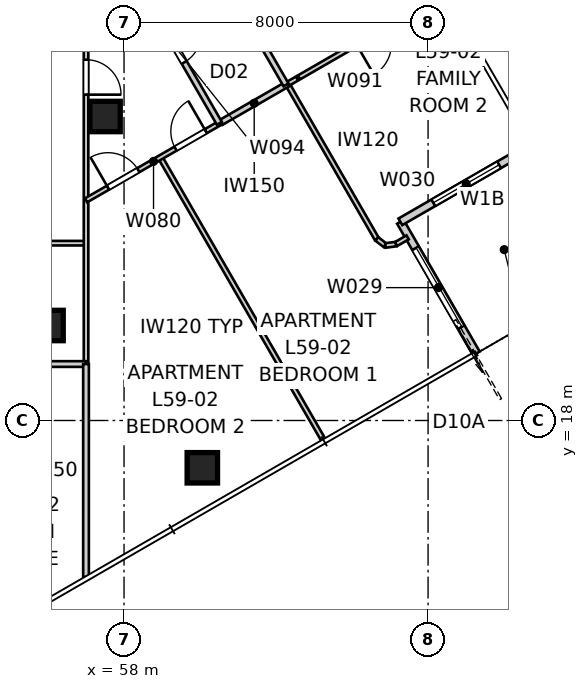
"""IFC4 building model, lengths in metres.
Left out: names, types, materials, properties, quantities, classifications, styles, units other than length and angle.
Written with IfcOpenShell. Run it as: python <this file> out.ifc"""

import sys

from ifc_helpers import new_model, si_unit, direction, frame, frame_2d, origin, origin_2d, place, context, subcontext, project, spatial, rectangle, extrude, element, fill, save


model = new_model("IFC4")
c1 = context("Model", 3, precision=1e-05, world=origin(), true_north=direction((0.0, 1.0)))
c2 = subcontext(c1, "Body", "Model", "MODEL_VIEW")
j1 = project(units=[si_unit("LENGTHUNIT", "METRE"), si_unit("PLANEANGLEUNIT", "RADIAN")], contexts=[c1])
p1 = place(None, origin())
s1 = spatial("IfcSite", under=j1, at=p1, CompositionType="ELEMENT")
p2 = place(p1, origin())
s2 = spatial("IfcBuilding", under=s1, at=p2, CompositionType="ELEMENT")
p3 = place(p2, frame((0.0, 0.0, 215.0)))
s3 = spatial("IfcBuildingStorey", under=s2, at=p3, CompositionType="ELEMENT", Elevation=215.0)
for number, where, z_axis, x_axis in (
    (1, (60.06, 16.755, 0.0), (0.0, 0.0, 1.0), (1.0, 0.0, 0.0)),
    (2, (57.5, 26.0, 0.0), (0.0, 0.0, 1.0), (1.0, 0.0, 0.0)),
    (3, (56.0, 20.5, 0.0), (0.0, 0.0, 1.0), (1.0, 0.0, 0.0)),
):
    element("IfcColumn", number, at=place(p3, frame(where, z_axis=z_axis, x_axis=x_axis)), inside=s3, PredefinedType="COLUMN", context=c2, shape_type="SweptSolid", body=[
        extrude(rectangle(XDim=0.8, YDim=0.8, at=origin_2d()), origin(), (0.0, 0.0, 1.0), 3.4),
    ])
p4 = place(p3, frame((67.271, 19.764, 0.0), z_axis=(0.0, 0.0, 1.0), x_axis=(-0.49999894854, 0.866026010844, 0.0)))
e4 = element("IfcWall", 4, at=p4, inside=s3, PredefinedType="SOLIDWALL", context=c2, shape_type="SweptSolid", body=[
    extrude(rectangle(XDim=4.0, YDim=0.2, at=frame_2d((2.0, 0.0))), origin(), (0.0, 0.0, 1.0), 3.25),
])
p5 = place(p4, frame((0.8, 0.0, 0.0)))
e5 = element("IfcOpeningElement", 5, at=p5, cuts=e4, PredefinedType="OPENING", context=c2, shape_type="SweptSolid", body=[
    extrude(rectangle(XDim=2.4, YDim=2.1, at=frame_2d((1.2, 1.05))), frame((0.0, 0.11, 0.0), z_axis=(0.0, -1.0, 0.0), x_axis=(1.0, 0.0, 0.0)), (0.0, 0.0, 1.0), 0.22),
])
p6 = place(p3, frame((65.271, 23.229, 0.0), z_axis=(0.0, 0.0, 1.0), x_axis=(0.866026010844, 0.49999894854, 0.0)))
e6 = element("IfcWall", 6, at=p6, inside=s3, PredefinedType="SOLIDWALL", context=c2, shape_type="SweptSolid", body=[
    extrude(rectangle(XDim=4.0, YDim=0.2, at=frame_2d((2.0, 0.0))), origin(), (0.0, 0.0, 1.0), 3.25),
])
p7 = place(p6, frame((1.0, 0.0, 0.45)))
e7 = element("IfcOpeningElement", 7, at=p7, cuts=e6, PredefinedType="OPENING", context=c2, shape_type="SweptSolid", body=[
    extrude(rectangle(XDim=2.0, YDim=1.8, at=frame_2d((1.0, 0.9))), frame((0.0, 0.11, 0.0), z_axis=(0.0, -1.0, 0.0), x_axis=(1.0, 0.0, 0.0)), (0.0, 0.0, 1.0), 0.22),
])
p8 = place(p3, frame((64.111, 33.239, 0.0), z_axis=(0.0, 0.0, 1.0), x_axis=(-0.866024069551, -0.500002310952, 0.0)))
e8 = element("IfcWall", 8, at=p8, inside=s3, PredefinedType="PARTITIONING", context=c2, shape_type="SweptSolid", body=[
    extrude(rectangle(XDim=10.95, YDim=0.25, at=frame_2d((5.475, 0.0))), origin(), (0.0, 0.0, 1.0), 3.25),
])
p9 = place(p3, frame((57.0, 22.667, 0.0), z_axis=(0.0, 0.0, 1.0), x_axis=(-1.0, 0.0, 0.0)))
e9 = element("IfcWall", 9, at=p9, inside=s3, PredefinedType="PARTITIONING", context=c2, shape_type="SweptSolid", body=[
    extrude(rectangle(XDim=4.9, YDim=0.12, at=frame_2d((2.45, 0.0))), origin(), (0.0, 0.0, 1.0), 3.25),
])
p10 = place(p9, frame((1.866, 0.0, 0.0)))
e10 = element("IfcOpeningElement", 10, at=p10, cuts=e9, PredefinedType="OPENING", context=c2, shape_type="SweptSolid", body=[
    extrude(rectangle(XDim=0.92, YDim=2.34, at=frame_2d((0.46, 1.17))), frame((0.0, 0.07, 0.0), z_axis=(0.0, -1.0, 0.0), x_axis=(1.0, 0.0, 0.0)), (0.0, 0.0, 1.0), 0.14),
])
p11 = place(p3, frame((57.0, 42.676, 0.0), z_axis=(0.0, 0.0, 1.0), x_axis=(0.0, -1.0, 0.0)))
e11 = element("IfcWall", 11, at=p11, inside=s3, PredefinedType="PARTITIONING", context=c2, shape_type="SweptSolid", body=[
    extrude(rectangle(XDim=23.19, YDim=0.12, at=frame_2d((11.595, 0.0))), origin(), (0.0, 0.0, 1.0), 2.55),
])
p12 = place(p11, frame((11.03, 0.0, 0.0)))
e12 = element("IfcOpeningElement", 12, at=p12, cuts=e11, PredefinedType="OPENING", context=c2, shape_type="SweptSolid", body=[
    extrude(rectangle(XDim=0.92, YDim=2.34, at=frame_2d((0.46, 1.17))), frame((0.0, 0.07, 0.0), z_axis=(0.0, -1.0, 0.0), x_axis=(1.0, 0.0, 0.0)), (0.0, 0.0, 1.0), 0.14),
])
p13 = place(p11, frame((15.181, 0.0, 0.0)))
e13 = element("IfcOpeningElement", 13, at=p13, cuts=e11, PredefinedType="OPENING", context=c2, shape_type="SweptSolid", body=[
    extrude(rectangle(XDim=0.92, YDim=2.34, at=frame_2d((0.46, 1.17))), frame((0.0, 0.07, 0.0), z_axis=(0.0, -1.0, 0.0), x_axis=(1.0, 0.0, 0.0)), (0.0, 0.0, 1.0), 0.14),
])
p14 = place(p3, frame((57.0, 19.486, 0.0), z_axis=(0.0, 0.0, 1.0), x_axis=(-1.0, 0.0, 0.0)))
e14 = element("IfcWall", 14, at=p14, inside=s3, PredefinedType="SOLIDWALL", context=c2, shape_type="SweptSolid", body=[
    extrude(rectangle(XDim=4.602, YDim=0.15, at=frame_2d((2.301, 0.0))), origin(), (0.0, 0.0, 1.0), 3.25),
])
p15 = place(p14, frame((1.841, 0.0, 0.0)))
e15 = element("IfcOpeningElement", 15, at=p15, cuts=e14, PredefinedType="OPENING", context=c2, shape_type="SweptSolid", body=[
    extrude(rectangle(XDim=0.92, YDim=2.1, at=frame_2d((0.46, 1.05))), frame((0.0, 0.085, 0.0), z_axis=(0.0, -1.0, 0.0), x_axis=(1.0, 0.0, 0.0)), (0.0, 0.0, 1.0), 0.17),
])
p16 = place(p3, frame((63.246, 17.487, 0.0), z_axis=(0.0, 0.0, 1.0), x_axis=(-0.49999898161, 0.866025991751, 0.0)))
e16 = element("IfcWall", 16, at=p16, inside=s3, PredefinedType="PARTITIONING", context=c2, shape_type="SweptSolid", body=[
    extrude(rectangle(XDim=8.585, YDim=0.12, at=frame_2d((4.292, 0.0))), origin(), (0.0, 0.0, 1.0), 3.25),
])
p17 = place(p3, frame((57.0, 23.793, 0.0), z_axis=(0.0, 0.0, 1.0), x_axis=(0.866007146345, 0.50003162148, 0.0)))
e17 = element("IfcWall", 17, at=p17, inside=s3, PredefinedType="PARTITIONING", context=c2, shape_type="SweptSolid", body=[
    extrude(rectangle(XDim=4.101, YDim=0.12, at=frame_2d((2.051, 0.0))), origin(), (0.0, 0.0, 1.0), 3.25),
])
p18 = place(p17, frame((0.668, 0.0, 0.0)))
e18 = element("IfcOpeningElement", 18, at=p18, cuts=e17, PredefinedType="OPENING", context=c2, shape_type="SweptSolid", body=[
    extrude(rectangle(XDim=0.92, YDim=2.34, at=frame_2d((0.46, 1.17))), frame((0.0, 0.07, 0.0), z_axis=(0.0, -1.0, 0.0), x_axis=(1.0, 0.0, 0.0)), (0.0, 0.0, 1.0), 0.14),
])
p19 = place(p17, frame((2.719, 0.0, 0.0)))
e19 = element("IfcOpeningElement", 19, at=p19, cuts=e17, PredefinedType="OPENING", context=c2, shape_type="SweptSolid", body=[
    extrude(rectangle(XDim=0.92, YDim=2.34, at=frame_2d((0.46, 1.17))), frame((0.0, 0.07, 0.0), z_axis=(0.0, -1.0, 0.0), x_axis=(1.0, 0.0, 0.0)), (0.0, 0.0, 1.0), 0.14),
])
p20 = place(p3, frame((62.299, 26.853, 0.0), z_axis=(0.0, 0.0, 1.0), x_axis=(0.500006955494, -0.866021387991, 0.0)))
e20 = element("IfcWall", 20, at=p20, inside=s3, PredefinedType="PARTITIONING", context=c2, shape_type="SweptSolid", body=[
    extrude(rectangle(XDim=4.705, YDim=0.12, at=frame_2d((2.352, 0.0))), origin(), (0.0, 0.0, 1.0), 3.25),
])
p21 = place(p3, frame((64.651, 22.778, 0.0), z_axis=(0.0, 0.0, 1.0), x_axis=(0.793231928283, -0.608919623557, 0.0)))
e21 = element("IfcWall", 21, at=p21, inside=s3, PredefinedType="PARTITIONING", context=c2, shape_type="SweptSolid", body=[
    extrude(rectangle(XDim=0.283, YDim=0.12, at=frame_2d((0.142, 0.0))), origin(), (0.0, 0.0, 1.0), 3.25),
])
p22 = place(p3, frame((64.876, 22.606, 0.0), z_axis=(0.0, 0.0, 1.0), x_axis=(0.991407364485, 0.130810693925, 0.0)))
e22 = element("IfcWall", 22, at=p22, inside=s3, PredefinedType="PARTITIONING", context=c2, shape_type="SweptSolid", body=[
    extrude(rectangle(XDim=0.284, YDim=0.12, at=frame_2d((0.142, 0.0))), origin(), (0.0, 0.0, 1.0), 3.25),
])
p23 = place(p3, frame((65.157, 22.643, 0.0), z_axis=(0.0, 0.0, 1.0), x_axis=(0.866058575552, 0.499942540411, 0.0)))
e23 = element("IfcWall", 23, at=p23, inside=s3, PredefinedType="PARTITIONING", context=c2, shape_type="SweptSolid", body=[
    extrude(rectangle(XDim=0.352, YDim=0.12, at=frame_2d((0.176, 0.0))), origin(), (0.0, 0.0, 1.0), 3.25),
])
p24 = place(p3, frame((60.552, 25.844, 0.0), z_axis=(0.0, 0.0, 1.0), x_axis=(0.866074730264, 0.499914554297, 0.0)))
e24 = element("IfcWall", 24, at=p24, inside=s3, PredefinedType="SOLIDWALL", context=c2, shape_type="SweptSolid", body=[
    extrude(rectangle(XDim=2.017, YDim=0.15, at=frame_2d((1.008, 0.0))), origin(), (0.0, 0.0, 1.0), 3.25),
])
p25 = place(p3, frame((57.0, 13.88, 0.0), z_axis=(0.0, 0.0, 1.0), x_axis=(4.3550213e-05, 0.999999999052, 0.0)))
e25 = element("IfcWall", 25, at=p25, inside=s3, PredefinedType="SOLIDWALL", context=c2, shape_type="SweptSolid", body=[
    extrude(rectangle(XDim=5.606, YDim=0.15, at=frame_2d((2.803, 0.0))), origin(), (0.0, 0.0, 1.0), 3.25),
])
p26 = place(p3, frame((62.555, 27.0, 0.0), z_axis=(0.0, 0.0, 1.0), x_axis=(-0.865896854829, -0.500222587251, 0.0)))
e26 = element("IfcWall", 26, at=p26, inside=s3, PredefinedType="PARTITIONING", context=c2, shape_type="SweptSolid", body=[
    extrude(rectangle(XDim=0.296, YDim=0.12, at=frame_2d((0.148, 0.0))), origin(), (0.0, 0.0, 1.0), 3.25),
])
p27 = place(p3, frame((66.388, 29.214, 0.0), z_axis=(0.0, 0.0, 1.0), x_axis=(-0.866032173762, -0.499988273872, 0.0)))
e27 = element("IfcWall", 27, at=p27, inside=s3, PredefinedType="PARTITIONING", context=c2, shape_type="SweptSolid", body=[
    extrude(rectangle(XDim=4.373, YDim=0.12, at=frame_2d((2.186, 0.0))), origin(), (0.0, 0.0, 1.0), 3.25),
])
p28 = place(p27, frame((1.706, 0.0, 0.0)))
e28 = element("IfcOpeningElement", 28, at=p28, cuts=e27, PredefinedType="OPENING", context=c2, shape_type="SweptSolid", body=[
    extrude(rectangle(XDim=0.92, YDim=2.34, at=frame_2d((0.46, 1.17))), frame((0.0, 0.07, 0.0), z_axis=(0.0, -1.0, 0.0), x_axis=(1.0, 0.0, 0.0)), (0.0, 0.0, 1.0), 0.14),
])
p29 = place(p3, frame((62.263, 26.832, 0.0), z_axis=(0.0, 0.0, 1.0), x_axis=(-0.499999662836, 0.866025598446, 0.0)))
e29 = element("IfcWall", 29, at=p29, inside=s3, PredefinedType="SOLIDWALL", context=c2, shape_type="SweptSolid", body=[
    extrude(rectangle(XDim=4.625, YDim=0.15, at=frame_2d((2.312, 0.0))), origin(), (0.0, 0.0, 1.0), 3.25),
])
p30 = place(p29, frame((1.853, 0.0, 0.0)))
e30 = element("IfcOpeningElement", 30, at=p30, cuts=e29, PredefinedType="OPENING", context=c2, shape_type="SweptSolid", body=[
    extrude(rectangle(XDim=0.92, YDim=2.34, at=frame_2d((0.46, 1.17))), frame((0.0, 0.085, 0.0), z_axis=(0.0, -1.0, 0.0), x_axis=(1.0, 0.0, 0.0)), (0.0, 0.0, 1.0), 0.17),
])
p31 = place(p3, frame((58.196, 29.824, 0.0), z_axis=(0.0, 0.0, 1.0), x_axis=(0.499999662836, -0.866025598446, 0.0)))
e31 = element("IfcWall", 31, at=p31, inside=s3, PredefinedType="SOLIDWALL", context=c2, shape_type="SweptSolid", body=[
    extrude(rectangle(XDim=4.625, YDim=0.15, at=frame_2d((2.312, 0.0))), origin(), (0.0, 0.0, 1.0), 3.25),
])
p32 = place(p31, frame((1.853, 0.0, 0.0)))
e32 = element("IfcOpeningElement", 32, at=p32, cuts=e31, PredefinedType="OPENING", context=c2, shape_type="SweptSolid", body=[
    extrude(rectangle(XDim=0.92, YDim=2.34, at=frame_2d((0.46, 1.17))), frame((0.0, 0.085, 0.0), z_axis=(0.0, -1.0, 0.0), x_axis=(1.0, 0.0, 0.0)), (0.0, 0.0, 1.0), 0.17),
])
p33 = place(p5, origin())
e33 = element("IfcDoor", 33, at=p33, inside=s3, OperationType="SLIDING_TO_LEFT", PredefinedType="DOOR", context=c2, shape_type="SweptSolid", body=[
    extrude(rectangle(XDim=2.4, YDim=2.1, at=frame_2d((1.2, 1.05))), frame((0.0, 0.025, 0.0), z_axis=(0.0, -1.0, 0.0), x_axis=(1.0, 0.0, 0.0)), (0.0, 0.0, 1.0), 0.05),
])
fill(e5, e33)
p34 = place(p7, origin())
e34 = element("IfcWindow", 34, at=p34, inside=s3, PartitioningType="SINGLE_PANEL", PredefinedType="WINDOW", context=c2, shape_type="SweptSolid", body=[
    extrude(rectangle(XDim=2.0, YDim=1.8, at=frame_2d((1.0, 0.9))), frame((0.0, 0.03, 0.0), z_axis=(0.0, -1.0, 0.0), x_axis=(1.0, 0.0, 0.0)), (0.0, 0.0, 1.0), 0.06),
])
fill(e7, e34)
p35 = place(p13, origin())
e35 = element("IfcDoor", 35, at=p35, inside=s3, OperationType="SINGLE_SWING_RIGHT", PredefinedType="DOOR", context=c2, shape_type="SweptSolid", body=[
    extrude(rectangle(XDim=0.92, YDim=2.34, at=frame_2d((0.46, 1.17))), frame((0.0, 0.025, 0.0), z_axis=(0.0, -1.0, 0.0), x_axis=(1.0, 0.0, 0.0)), (0.0, 0.0, 1.0), 0.05),
])
fill(e13, e35)
p36 = place(p32, origin())
e36 = element("IfcDoor", 36, at=p36, inside=s3, OperationType="SINGLE_SWING_LEFT", PredefinedType="DOOR", context=c2, shape_type="SweptSolid", body=[
    extrude(rectangle(XDim=0.92, YDim=2.34, at=frame_2d((0.46, 1.17))), frame((0.0, 0.025, 0.0), z_axis=(0.0, -1.0, 0.0), x_axis=(1.0, 0.0, 0.0)), (0.0, 0.0, 1.0), 0.05),
])
fill(e32, e36)
p37 = place(p18, origin())
e37 = element("IfcDoor", 37, at=p37, inside=s3, OperationType="SINGLE_SWING_LEFT", PredefinedType="DOOR", context=c2, shape_type="SweptSolid", body=[
    extrude(rectangle(XDim=0.92, YDim=2.34, at=frame_2d((0.46, 1.17))), frame((0.0, 0.025, 0.0), z_axis=(0.0, -1.0, 0.0), x_axis=(1.0, 0.0, 0.0)), (0.0, 0.0, 1.0), 0.05),
])
fill(e18, e37)
p38 = place(p19, origin())
e38 = element("IfcDoor", 38, at=p38, inside=s3, OperationType="SINGLE_SWING_RIGHT", PredefinedType="DOOR", context=c2, shape_type="SweptSolid", body=[
    extrude(rectangle(XDim=0.92, YDim=2.34, at=frame_2d((0.46, 1.17))), frame((0.0, 0.025, 0.0), z_axis=(0.0, -1.0, 0.0), x_axis=(1.0, 0.0, 0.0)), (0.0, 0.0, 1.0), 0.05),
])
fill(e19, e38)
save(model, sys.argv[1])
